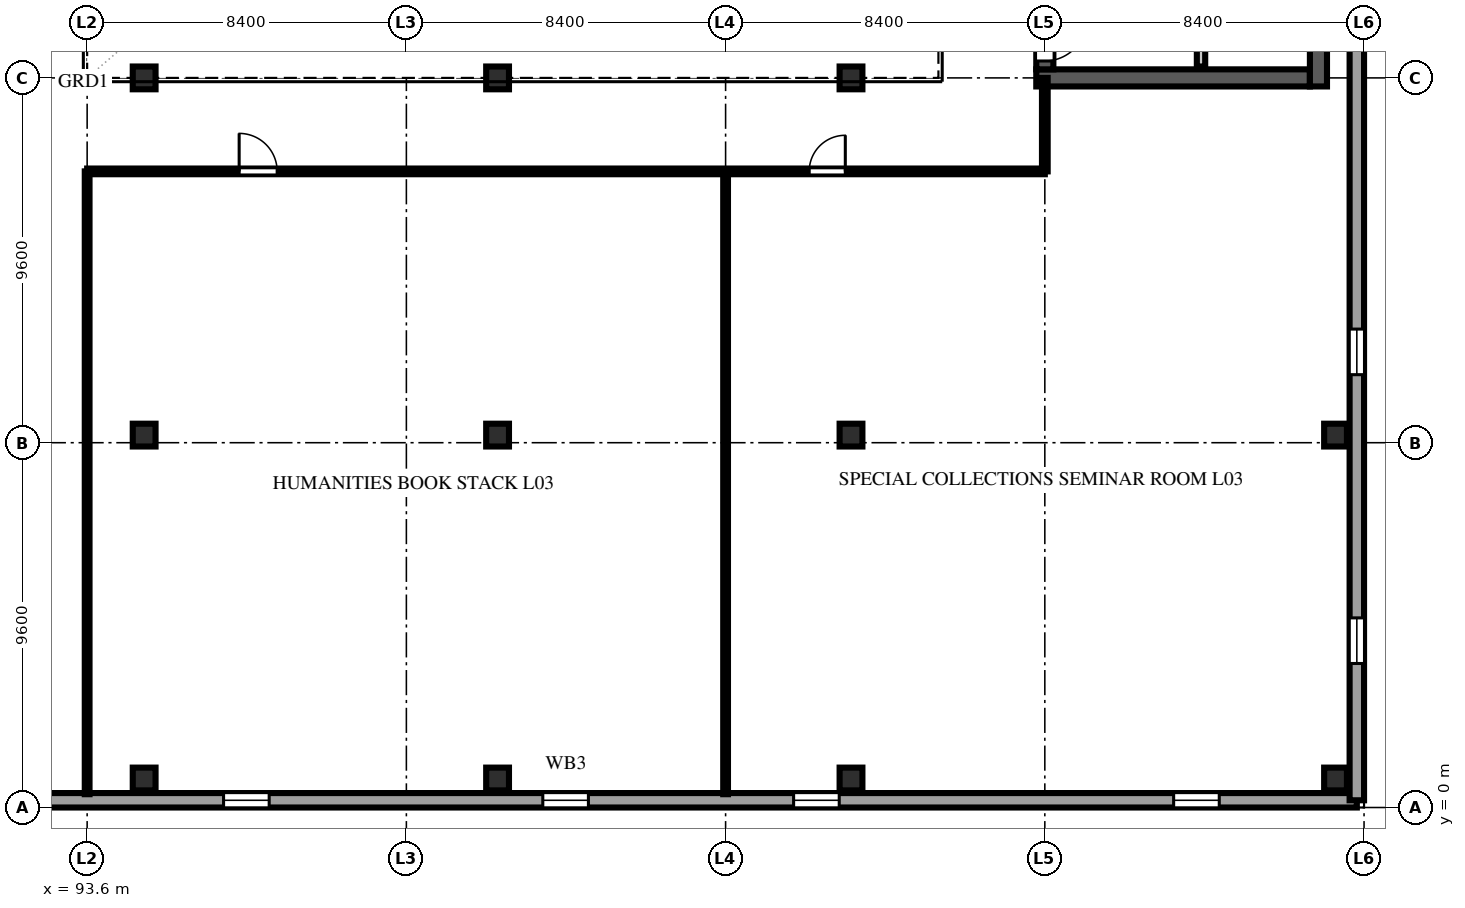
"""IFC4 building model, lengths in metres.
Left out: names, types, materials, properties, quantities, classifications, styles, units other than length and angle.
Written with IfcOpenShell. Run it as: python <this file> out.ifc"""

import sys

from ifc_helpers import new_model, si_unit, direction, frame, frame_2d, origin, origin_2d, place, context, subcontext, project, spatial, rectangle, extrude, element, fill, save


model = new_model("IFC4")
c1 = context("Model", 3, precision=1e-05, world=origin(), true_north=direction((0.0, 1.0)))
c2 = subcontext(c1, "Body", "Model", "MODEL_VIEW")
j1 = project(units=[si_unit("LENGTHUNIT", "METRE"), si_unit("PLANEANGLEUNIT", "RADIAN")], contexts=[c1])
p1 = place(None, origin())
s1 = spatial("IfcSite", under=j1, at=p1, CompositionType="ELEMENT")
p2 = place(p1, origin())
s2 = spatial("IfcBuilding", under=s1, at=p2, CompositionType="ELEMENT")
p3 = place(p2, frame((0.0, 0.0, 15.0)))
s3 = spatial("IfcBuildingStorey", under=s2, at=p3, CompositionType="ELEMENT", Elevation=15.0)
p4 = place(p3, frame((118.575, 19.2, 0.0), z_axis=(0.0, 0.0, 1.0), x_axis=(1.0, 0.0, 0.0)))
e1 = element("IfcWall", 1, at=p4, inside=s3, PredefinedType="SHEAR", context=c2, shape_type="SweptSolid", body=[
    extrude(rectangle(XDim=7.2, YDim=0.45, at=frame_2d((3.6, 0.0))), origin(), (0.0, 0.0, 1.0), 4.25),
])
p5 = place(p3, frame((126.0, 18.975, 0.0), z_axis=(0.0, 0.0, 1.0), x_axis=(0.0, 1.0, 0.0)))
e2 = element("IfcWall", 2, at=p5, inside=s3, PredefinedType="SHEAR", context=c2, shape_type="SweptSolid", body=[
    extrude(rectangle(XDim=19.65, YDim=0.45, at=frame_2d((9.825, 0.0))), origin(), (0.0, 0.0, 1.0), 4.25),
])
p6 = place(p3, frame((118.8, 19.425, 0.0), z_axis=(0.0, 0.0, 1.0), x_axis=(0.0, 1.0, 0.0)))
e3 = element("IfcWall", 3, at=p6, inside=s3, PredefinedType="SHEAR", context=c2, shape_type="SweptSolid", body=[
    extrude(rectangle(XDim=8.575, YDim=0.45, at=frame_2d((4.288, 0.0))), origin(), (0.0, 0.0, 1.0), 4.25),
])
p7 = place(p6, frame((0.22, 0.0, 0.0)))
e4 = element("IfcOpeningElement", 4, at=p7, cuts=e3, PredefinedType="OPENING", context=c2, shape_type="SweptSolid", body=[
    extrude(rectangle(XDim=1.1, YDim=2.2, at=frame_2d((0.55, 1.1))), frame((0.0, 0.237, 0.0), z_axis=(0.0, -1.0, 0.0), x_axis=(1.0, 0.0, 0.0)), (0.0, 0.0, 1.0), 0.474),
])
for number, where, z_axis, x_axis in (
    (5, (95.1, 0.75, 0.0), (0.0, 0.0, 1.0), (1.0, 0.0, 0.0)),
    (6, (95.1, 9.8, 0.0), (0.0, 0.0, 1.0), (1.0, 0.0, 0.0)),
    (7, (95.1, 19.2, 0.0), (0.0, 0.0, 1.0), (1.0, 0.0, 0.0)),
    (8, (104.4, 0.75, 0.0), (0.0, 0.0, 1.0), (1.0, 0.0, 0.0)),
    (9, (104.4, 9.8, 0.0), (0.0, 0.0, 1.0), (1.0, 0.0, 0.0)),
    (10, (104.4, 19.2, 0.0), (0.0, 0.0, 1.0), (1.0, 0.0, 0.0)),
    (11, (113.7, 0.75, 0.0), (0.0, 0.0, 1.0), (1.0, 0.0, 0.0)),
    (12, (113.7, 9.8, 0.0), (0.0, 0.0, 1.0), (1.0, 0.0, 0.0)),
    (13, (113.7, 19.2, 0.0), (0.0, 0.0, 1.0), (1.0, 0.0, 0.0)),
    (14, (126.45, 0.75, 0.0), (0.0, 0.0, 1.0), (1.0, 0.0, 0.0)),
    (15, (126.45, 9.8, 0.0), (0.0, 0.0, 1.0), (1.0, 0.0, 0.0)),
):
    element("IfcColumn", number, at=place(p3, frame(where, z_axis=z_axis, x_axis=x_axis)), inside=s3, PredefinedType="COLUMN", context=c2, shape_type="SweptSolid", body=[
        extrude(rectangle(XDim=0.6, YDim=0.6, at=origin_2d()), origin(), (0.0, 0.0, 1.0), 4.6),
    ])
p8 = place(p3, frame((85.39, 0.19, 0.0), z_axis=(0.0, 0.0, 1.0), x_axis=(1.0, 0.0, 0.0)))
e16 = element("IfcWall", 16, at=p8, inside=s3, PredefinedType="SOLIDWALL", context=c2, shape_type="SweptSolid", body=[
    extrude(rectangle(XDim=41.62, YDim=0.38, at=frame_2d((20.81, 0.0))), origin(), (0.0, 0.0, 1.0), 4.25),
])
p9 = place(p8, frame((5.0, 0.0, 1.25)))
e17 = element("IfcOpeningElement", 17, at=p9, cuts=e16, PredefinedType="OPENING", context=c2, shape_type="SweptSolid", body=[
    extrude(rectangle(XDim=1.2, YDim=1.65, at=frame_2d((0.6, 0.825))), frame((0.0, 0.202, 0.0), z_axis=(0.0, -1.0, 0.0), x_axis=(1.0, 0.0, 0.0)), (0.0, 0.0, 1.0), 0.404),
])
p10 = place(p8, frame((11.8, 0.0, 1.25)))
e18 = element("IfcOpeningElement", 18, at=p10, cuts=e16, PredefinedType="OPENING", context=c2, shape_type="SweptSolid", body=[
    extrude(rectangle(XDim=1.2, YDim=1.65, at=frame_2d((0.6, 0.825))), frame((0.0, 0.202, 0.0), z_axis=(0.0, -1.0, 0.0), x_axis=(1.0, 0.0, 0.0)), (0.0, 0.0, 1.0), 0.404),
])
p11 = place(p8, frame((20.2, 0.0, 1.25)))
e19 = element("IfcOpeningElement", 19, at=p11, cuts=e16, PredefinedType="OPENING", context=c2, shape_type="SweptSolid", body=[
    extrude(rectangle(XDim=1.2, YDim=1.65, at=frame_2d((0.6, 0.825))), frame((0.0, 0.202, 0.0), z_axis=(0.0, -1.0, 0.0), x_axis=(1.0, 0.0, 0.0)), (0.0, 0.0, 1.0), 0.404),
])
p12 = place(p8, frame((26.8, 0.0, 1.25)))
e20 = element("IfcOpeningElement", 20, at=p12, cuts=e16, PredefinedType="OPENING", context=c2, shape_type="SweptSolid", body=[
    extrude(rectangle(XDim=1.2, YDim=1.65, at=frame_2d((0.6, 0.825))), frame((0.0, 0.202, 0.0), z_axis=(0.0, -1.0, 0.0), x_axis=(1.0, 0.0, 0.0)), (0.0, 0.0, 1.0), 0.404),
])
p13 = place(p8, frame((36.8, 0.0, 1.25)))
e21 = element("IfcOpeningElement", 21, at=p13, cuts=e16, PredefinedType="OPENING", context=c2, shape_type="SweptSolid", body=[
    extrude(rectangle(XDim=1.2, YDim=1.65, at=frame_2d((0.6, 0.825))), frame((0.0, 0.202, 0.0), z_axis=(0.0, -1.0, 0.0), x_axis=(1.0, 0.0, 0.0)), (0.0, 0.0, 1.0), 0.404),
])
p14 = place(p3, frame((127.01, 0.19, 0.0), z_axis=(0.0, 0.0, 1.0), x_axis=(0.0, 1.0, 0.0)))
e22 = element("IfcWall", 22, at=p14, inside=s3, PredefinedType="SOLIDWALL", context=c2, shape_type="SweptSolid", body=[
    extrude(rectangle(XDim=57.22, YDim=0.38, at=frame_2d((28.61, 0.0))), origin(), (0.0, 0.0, 1.0), 4.25),
])
p15 = place(p14, frame((3.6, 0.0, 1.25)))
e23 = element("IfcOpeningElement", 23, at=p15, cuts=e22, PredefinedType="OPENING", context=c2, shape_type="SweptSolid", body=[
    extrude(rectangle(XDim=1.2, YDim=1.65, at=frame_2d((0.6, 0.825))), frame((0.0, 0.202, 0.0), z_axis=(0.0, -1.0, 0.0), x_axis=(1.0, 0.0, 0.0)), (0.0, 0.0, 1.0), 0.404),
])
p16 = place(p14, frame((11.2, 0.0, 1.25)))
e24 = element("IfcOpeningElement", 24, at=p16, cuts=e22, PredefinedType="OPENING", context=c2, shape_type="SweptSolid", body=[
    extrude(rectangle(XDim=1.2, YDim=1.65, at=frame_2d((0.6, 0.825))), frame((0.0, 0.202, 0.0), z_axis=(0.0, -1.0, 0.0), x_axis=(1.0, 0.0, 0.0)), (0.0, 0.0, 1.0), 0.404),
])
p17 = place(p14, frame((41.6, 0.0, 1.25)))
e25 = element("IfcOpeningElement", 25, at=p17, cuts=e22, PredefinedType="OPENING", context=c2, shape_type="SweptSolid", body=[
    extrude(rectangle(XDim=1.2, YDim=1.65, at=frame_2d((0.6, 0.825))), frame((0.0, 0.202, 0.0), z_axis=(0.0, -1.0, 0.0), x_axis=(1.0, 0.0, 0.0)), (0.0, 0.0, 1.0), 0.404),
])
p18 = place(p14, frame((49.2, 0.0, 1.25)))
e26 = element("IfcOpeningElement", 26, at=p18, cuts=e22, PredefinedType="OPENING", context=c2, shape_type="SweptSolid", body=[
    extrude(rectangle(XDim=1.2, YDim=1.65, at=frame_2d((0.6, 0.825))), frame((0.0, 0.202, 0.0), z_axis=(0.0, -1.0, 0.0), x_axis=(1.0, 0.0, 0.0)), (0.0, 0.0, 1.0), 0.404),
])
p19 = place(p3, frame((122.91, 19.5, 0.0), z_axis=(0.0, 0.0, 1.0), x_axis=(0.0, 1.0, 0.0)))
e27 = element("IfcWall", 27, at=p19, inside=s3, PredefinedType="SOLIDWALL", context=c2, shape_type="SweptSolid", body=[
    extrude(rectangle(XDim=7.71, YDim=0.22, at=frame_2d((3.855, 0.0))), origin(), (0.0, 0.0, 1.0), 4.25),
])
for number, where, z_axis, x_axis in (
    (28, (93.6, 0.35, 0.0), (0.0, 0.0, 1.0), (0.0, 1.0, 0.0)),
    (29, (110.4, 0.35, 0.0), (0.0, 0.0, 1.0), (0.0, 1.0, 0.0)),
):
    element("IfcWall", number, at=place(p3, frame(where, z_axis=z_axis, x_axis=x_axis)), inside=s3, PredefinedType="PARTITIONING", context=c2, shape_type="SweptSolid", body=[
        extrude(rectangle(XDim=16.39, YDim=0.125, at=frame_2d((8.195, 0.0))), origin(), (0.0, 0.0, 1.0), 4.25),
    ])
p20 = place(p3, frame((118.8, 16.74, 0.0), z_axis=(0.0, 0.0, 1.0), x_axis=(0.0, 1.0, 0.0)))
e30 = element("IfcWall", 30, at=p20, inside=s3, PredefinedType="PARTITIONING", context=c2, shape_type="SweptSolid", body=[
    extrude(rectangle(XDim=2.46, YDim=0.15, at=frame_2d((1.23, 0.0))), origin(), (0.0, 0.0, 1.0), 4.25),
])
p21 = place(p3, frame((93.6, 16.74, 0.0), z_axis=(0.0, 0.0, 1.0), x_axis=(1.0, 0.0, 0.0)))
e31 = element("IfcWall", 31, at=p21, inside=s3, PredefinedType="PARTITIONING", context=c2, shape_type="SweptSolid", body=[
    extrude(rectangle(XDim=25.2, YDim=0.15, at=frame_2d((12.6, 0.0))), origin(), (0.0, 0.0, 1.0), 4.25),
])
p22 = place(p21, frame((4.0, 0.0, 0.0)))
e32 = element("IfcOpeningElement", 32, at=p22, cuts=e31, PredefinedType="OPENING", context=c2, shape_type="SweptSolid", body=[
    extrude(rectangle(XDim=1.0, YDim=2.2, at=frame_2d((0.5, 1.1))), frame((0.0, 0.087, 0.0), z_axis=(0.0, -1.0, 0.0), x_axis=(1.0, 0.0, 0.0)), (0.0, 0.0, 1.0), 0.174),
])
p23 = place(p21, frame((19.0, 0.0, 0.0)))
e33 = element("IfcOpeningElement", 33, at=p23, cuts=e31, PredefinedType="OPENING", context=c2, shape_type="SweptSolid", body=[
    extrude(rectangle(XDim=0.95, YDim=2.15, at=frame_2d((0.475, 1.075))), frame((0.0, 0.087, 0.0), z_axis=(0.0, -1.0, 0.0), x_axis=(1.0, 0.0, 0.0)), (0.0, 0.0, 1.0), 0.174),
])
p24 = place(p10, origin())
e34 = element("IfcWindow", 34, at=p24, inside=s3, PartitioningType="SINGLE_PANEL", PredefinedType="WINDOW", context=c2, shape_type="SweptSolid", body=[
    extrude(rectangle(XDim=1.2, YDim=1.65, at=frame_2d((0.6, 0.825))), frame((0.0, 0.11, 0.0), z_axis=(0.0, -1.0, 0.0), x_axis=(1.0, 0.0, 0.0)), (0.0, 0.0, 1.0), 0.06),
])
fill(e18, e34)
p25 = place(p11, origin())
e35 = element("IfcWindow", 35, at=p25, inside=s3, PartitioningType="SINGLE_PANEL", PredefinedType="WINDOW", context=c2, shape_type="SweptSolid", body=[
    extrude(rectangle(XDim=1.2, YDim=1.65, at=frame_2d((0.6, 0.825))), frame((0.0, 0.11, 0.0), z_axis=(0.0, -1.0, 0.0), x_axis=(1.0, 0.0, 0.0)), (0.0, 0.0, 1.0), 0.06),
])
fill(e19, e35)
p26 = place(p12, origin())
e36 = element("IfcWindow", 36, at=p26, inside=s3, PartitioningType="SINGLE_PANEL", PredefinedType="WINDOW", context=c2, shape_type="SweptSolid", body=[
    extrude(rectangle(XDim=1.2, YDim=1.65, at=frame_2d((0.6, 0.825))), frame((0.0, 0.11, 0.0), z_axis=(0.0, -1.0, 0.0), x_axis=(1.0, 0.0, 0.0)), (0.0, 0.0, 1.0), 0.06),
])
fill(e20, e36)
p27 = place(p13, origin())
e37 = element("IfcWindow", 37, at=p27, inside=s3, PartitioningType="SINGLE_PANEL", PredefinedType="WINDOW", context=c2, shape_type="SweptSolid", body=[
    extrude(rectangle(XDim=1.2, YDim=1.65, at=frame_2d((0.6, 0.825))), frame((0.0, 0.11, 0.0), z_axis=(0.0, -1.0, 0.0), x_axis=(1.0, 0.0, 0.0)), (0.0, 0.0, 1.0), 0.06),
])
fill(e21, e37)
p28 = place(p15, origin())
e38 = element("IfcWindow", 38, at=p28, inside=s3, PartitioningType="SINGLE_PANEL", PredefinedType="WINDOW", context=c2, shape_type="SweptSolid", body=[
    extrude(rectangle(XDim=1.2, YDim=1.65, at=frame_2d((0.6, 0.825))), frame((0.0, 0.11, 0.0), z_axis=(0.0, -1.0, 0.0), x_axis=(1.0, 0.0, 0.0)), (0.0, 0.0, 1.0), 0.06),
])
fill(e23, e38)
p29 = place(p16, origin())
e39 = element("IfcWindow", 39, at=p29, inside=s3, PartitioningType="SINGLE_PANEL", PredefinedType="WINDOW", context=c2, shape_type="SweptSolid", body=[
    extrude(rectangle(XDim=1.2, YDim=1.65, at=frame_2d((0.6, 0.825))), frame((0.0, 0.11, 0.0), z_axis=(0.0, -1.0, 0.0), x_axis=(1.0, 0.0, 0.0)), (0.0, 0.0, 1.0), 0.06),
])
fill(e24, e39)
p30 = place(p7, frame((1.1, 0.0, 0.0), z_axis=(0.0, 0.0, 1.0), x_axis=(-1.0, 0.0, 0.0)))
e40 = element("IfcDoor", 40, at=p30, inside=s3, OperationType="SINGLE_SWING_LEFT", PredefinedType="DOOR", context=c2, shape_type="SweptSolid", body=[
    extrude(rectangle(XDim=1.1, YDim=2.2, at=frame_2d((0.55, 1.1))), frame((0.0, 0.025, 0.0), z_axis=(0.0, -1.0, 0.0), x_axis=(1.0, 0.0, 0.0)), (0.0, 0.0, 1.0), 0.05),
])
fill(e4, e40)
p31 = place(p22, origin())
e41 = element("IfcDoor", 41, at=p31, inside=s3, OperationType="SINGLE_SWING_LEFT", PredefinedType="DOOR", context=c2, shape_type="SweptSolid", body=[
    extrude(rectangle(XDim=1.0, YDim=2.2, at=frame_2d((0.5, 1.1))), frame((0.0, 0.025, 0.0), z_axis=(0.0, -1.0, 0.0), x_axis=(1.0, 0.0, 0.0)), (0.0, 0.0, 1.0), 0.05),
])
fill(e32, e41)
p32 = place(p23, origin())
e42 = element("IfcDoor", 42, at=p32, inside=s3, OperationType="SINGLE_SWING_RIGHT", PredefinedType="DOOR", context=c2, shape_type="SweptSolid", body=[
    extrude(rectangle(XDim=0.95, YDim=2.15, at=frame_2d((0.475, 1.075))), frame((0.0, 0.025, 0.0), z_axis=(0.0, -1.0, 0.0), x_axis=(1.0, 0.0, 0.0)), (0.0, 0.0, 1.0), 0.05),
])
fill(e33, e42)
save(model, sys.argv[1])
